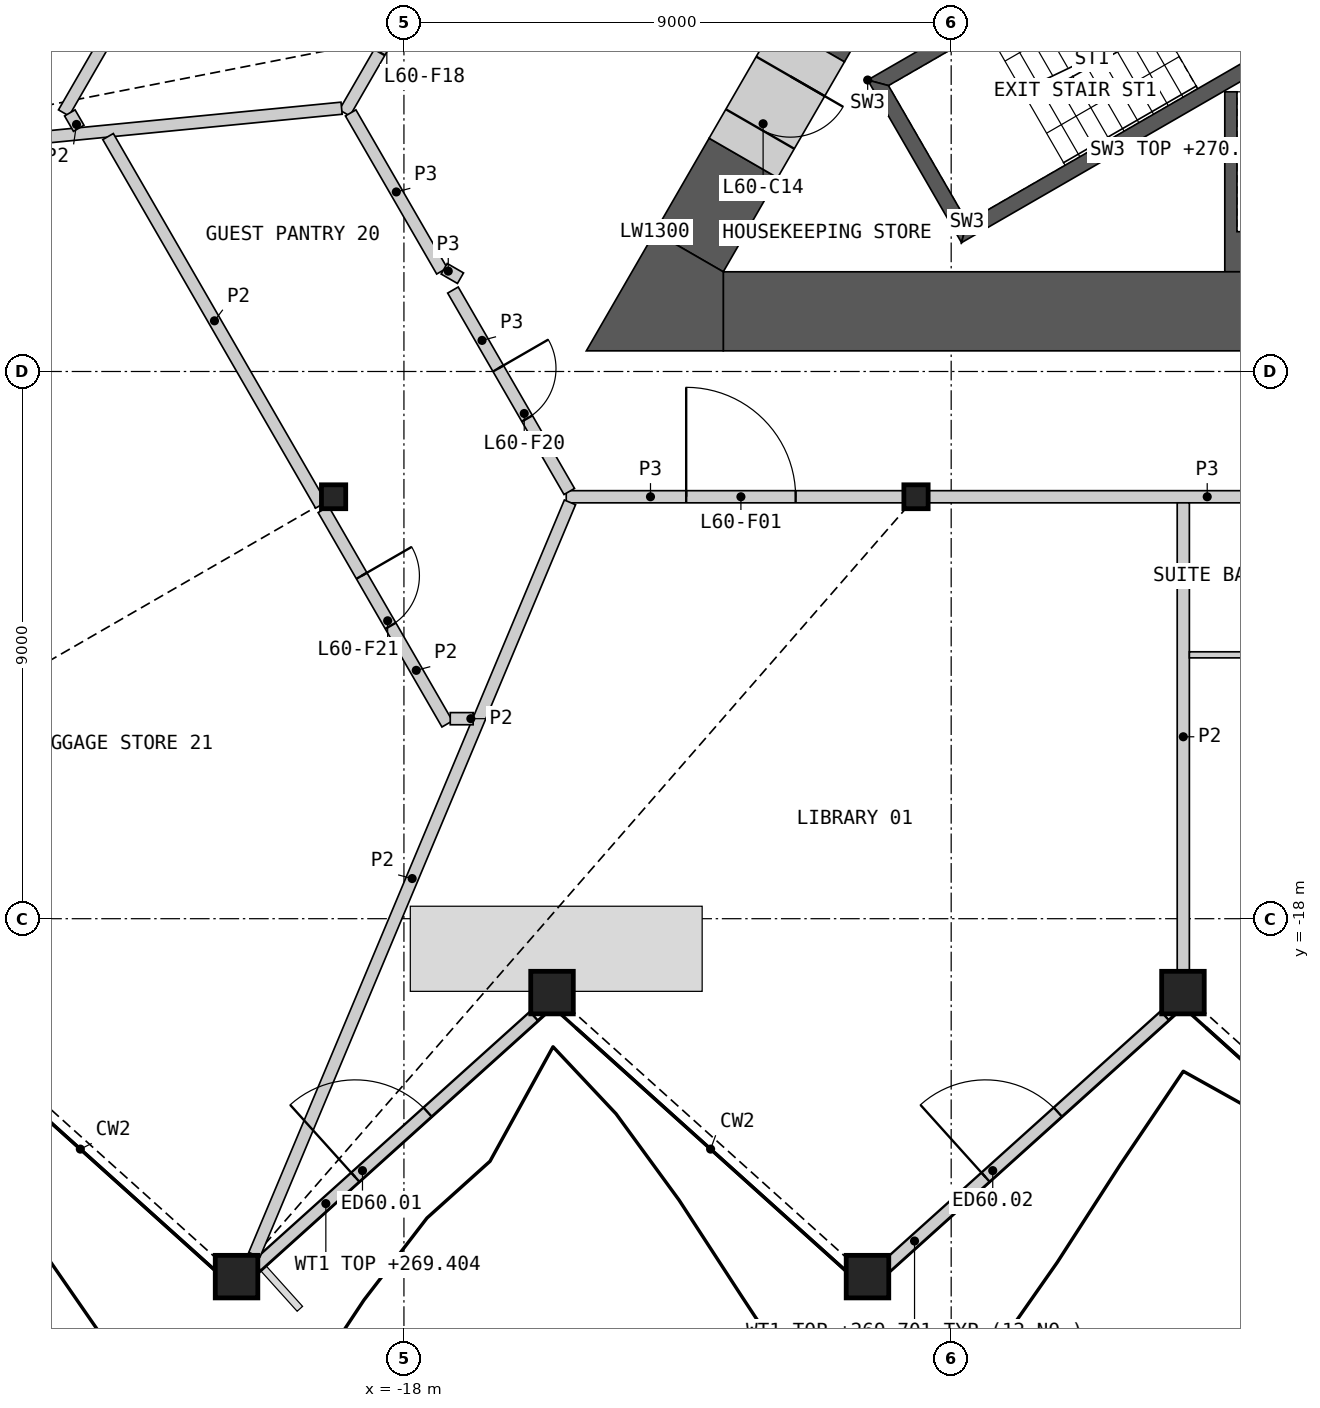
"""IFC4 building model, lengths in metres.
Left out: names, types, materials, properties, quantities, classifications, styles, units other than length and angle.
Written with IfcOpenShell. Run it as: python <this file> out.ifc"""

import sys

from ifc_helpers import new_model, si_unit, direction, frame, frame_2d, origin, origin_2d, place, context, subcontext, project, spatial, polyline, rectangle, hollow_rectangle, i_section, outline, extrude, element, fill, save


model = new_model("IFC4")
c1 = context("Model", 3, precision=1e-05, world=origin(), true_north=direction((0.0, 1.0)))
c2 = subcontext(c1, "Body", "Model", "MODEL_VIEW")
j1 = project(units=[si_unit("LENGTHUNIT", "METRE"), si_unit("PLANEANGLEUNIT", "RADIAN")], contexts=[c1])
p1 = place(None, origin())
s1 = spatial("IfcSite", under=j1, at=p1, CompositionType="ELEMENT")
p2 = place(p1, origin())
s2 = spatial("IfcBuilding", under=s1, at=p2, CompositionType="ELEMENT")
p3 = place(p2, frame((0.0, 0.0, 267.0)))
s3 = spatial("IfcBuildingStorey", under=s2, at=p3, CompositionType="ELEMENT", Elevation=267.0)
for number, where, z_axis, x_axis in (
    (1, (-20.753, -23.887, 0.0), (0.0, 0.0, 1.0), (1.0, 0.0, 0.0)),
    (2, (-15.565, -19.215, 0.0), (0.0, 0.0, 1.0), (1.0, 0.0, 0.0)),
    (3, (-10.376, -23.887, 0.0), (0.0, 0.0, 1.0), (1.0, 0.0, 0.0)),
    (4, (-5.188, -19.215, 0.0), (0.0, 0.0, 1.0), (1.0, 0.0, 0.0)),
):
    element("IfcColumn", number, at=place(p3, frame(where, z_axis=z_axis, x_axis=x_axis)), inside=s3, PredefinedType="COLUMN", context=c2, shape_type="SweptSolid", body=[
        extrude(hollow_rectangle(XDim=0.7, YDim=0.7, WallThickness=0.045, at=origin_2d()), origin(), (0.0, 0.0, 1.0), 3.6),
    ])
for number, where, z_axis, x_axis in (
    (5, (-19.157, -11.06, 0.0), (0.0, 0.0, 1.0), (1.0, 0.0, 0.0)),
    (6, (-9.578, -11.06, 0.0), (0.0, 0.0, 1.0), (1.0, 0.0, 0.0)),
):
    element("IfcColumn", number, at=place(p3, frame(where, z_axis=z_axis, x_axis=x_axis)), inside=s3, PredefinedType="COLUMN", context=c2, shape_type="SweptSolid", body=[
        extrude(i_section(OverallWidth=0.399, OverallDepth=0.393, WebThickness=0.023, FlangeThickness=0.037, at=origin_2d()), origin(), (0.0, 0.0, 1.0), 3.6),
    ])
p4 = place(p3, frame((-20.425, -23.713, 0.0), z_axis=(0.0, 0.0, 1.0), x_axis=(0.74316565197, 0.669107475472, 0.0)))
e7 = element("IfcWall", 7, at=p4, inside=s3, PredefinedType="SOLIDWALL", context=c2, shape_type="SweptSolid", body=[
    extrude(rectangle(XDim=6.142, YDim=0.2, at=frame_2d((3.071, 0.0))), origin(), (0.0, 0.0, 1.0), 2.404),
])
p5 = place(p4, frame((2.186, 0.0, 0.0)))
e8 = element("IfcOpeningElement", 8, at=p5, cuts=e7, PredefinedType="OPENING", context=c2, shape_type="SweptSolid", body=[
    extrude(rectangle(XDim=1.6, YDim=2.4, at=frame_2d((0.8, 1.2))), frame((0.0, 0.11, 0.0), z_axis=(0.0, -1.0, 0.0), x_axis=(1.0, 0.0, 0.0)), (0.0, 0.0, 1.0), 0.22),
])
p6 = place(p3, frame((-10.06, -23.713, 0.0), z_axis=(0.0, 0.0, 1.0), x_axis=(0.74316789204, 0.669104987458, 0.0)))
e9 = element("IfcWall", 9, at=p6, inside=s3, PredefinedType="SOLIDWALL", context=c2, shape_type="SweptSolid", body=[
    extrude(rectangle(XDim=6.154, YDim=0.2, at=frame_2d((3.077, 0.0))), origin(), (0.0, 0.0, 1.0), 2.701),
])
p7 = place(p6, frame((2.186, 0.0, 0.0)))
e10 = element("IfcOpeningElement", 10, at=p7, cuts=e9, PredefinedType="OPENING", context=c2, shape_type="SweptSolid", body=[
    extrude(rectangle(XDim=1.6, YDim=2.4, at=frame_2d((0.8, 1.2))), frame((0.0, 0.11, 0.0), z_axis=(0.0, -1.0, 0.0), x_axis=(1.0, 0.0, 0.0)), (0.0, 0.0, 1.0), 0.22),
])
p8 = place(p3, origin())
e11 = element("IfcWall", 11, at=p8, inside=s3, PredefinedType="SHEAR", context=c2, shape_type="SweptSolid", body=[
    extrude(outline(polyline([(0.1, -7.36), (-4.5, -7.36), (-4.5, -4.4), (-4.3, -4.4), (-4.3, -6.7), (-2.3, -6.7), (-2.3, -4.4), (-2.1, -4.4), (-2.1, -6.7), (-0.1, -6.7), (-0.1, -4.4), (0.1, -4.4), (0.1, -7.36)])), origin(), (0.0, 0.0, 1.0), 3.25),
])
p9 = place(p3, origin())
e12 = element("IfcWall", 12, at=p9, inside=s3, PredefinedType="SHEAR", context=c2, shape_type="SweptSolid", body=[
    extrude(outline(polyline([(-5.307, -1.281), (-10.374, -4.206), (-10.032, -4.298), (-5.182, -1.498), (-5.307, -1.281)])), origin(), (0.0, 0.0, 1.0), 3.25),
])
p10 = place(p3, origin())
e13 = element("IfcWall", 13, at=p10, inside=s3, PredefinedType="SHEAR", context=c2, shape_type="SweptSolid", body=[
    extrude(outline(polyline([(-10.374, -4.206), (-8.83, -6.881), (-8.738, -6.539), (-10.032, -4.298), (-10.374, -4.206)])), origin(), (0.0, 0.0, 1.0), 3.25),
])
p11 = place(p3, origin())
e14 = element("IfcWall", 14, at=p11, inside=s3, PredefinedType="SHEAR", context=c2, shape_type="SweptSolid", body=[
    extrude(outline(polyline([(-8.738, -6.539), (-8.83, -6.881), (-3.763, -3.956), (-3.888, -3.739), (-8.738, -6.539)])), origin(), (0.0, 0.0, 1.0), 3.25),
])
p12 = place(p3, frame((-5.199, -1.219, 0.0), z_axis=(0.0, 0.0, 1.0), x_axis=(0.499982516597, -0.866035497597, 0.0)))
e15 = element("IfcWall", 15, at=p12, inside=s3, PredefinedType="SHEAR", context=c2, shape_type="SweptSolid", body=[
    extrude(rectangle(XDim=3.088, YDim=0.25, at=frame_2d((1.544, 0.0))), origin(), (0.0, 0.0, 1.0), 3.25),
])
p13 = place(p12, frame((0.994, 0.0, 0.0)))
e16 = element("IfcOpeningElement", 16, at=p13, cuts=e15, PredefinedType="OPENING", context=c2, shape_type="SweptSolid", body=[
    extrude(rectangle(XDim=1.1, YDim=2.1, at=frame_2d((0.55, 1.05))), frame((0.0, 0.135, 0.0), z_axis=(0.0, -1.0, 0.0), x_axis=(1.0, 0.0, 0.0)), (0.0, 0.0, 1.0), 0.27),
])
p14 = place(p3, frame((-12.748, -8.01, 0.0), z_axis=(0.0, 0.0, 1.0), x_axis=(1.0, 0.0, 0.0)))
e17 = element("IfcWall", 17, at=p14, inside=s3, PredefinedType="SHEAR", context=c2, shape_type="SweptSolid", body=[
    extrude(rectangle(XDim=25.497, YDim=1.3, at=frame_2d((12.748, 0.0))), origin(), (0.0, 0.0, 1.0), 3.25),
])
p15 = place(p3, frame((-9.137, 0.195, 0.0), z_axis=(0.0, 0.0, 1.0), x_axis=(-0.499985697398, -0.866033661238, 0.0)))
e18 = element("IfcWall", 18, at=p15, inside=s3, PredefinedType="SHEAR", context=c2, shape_type="SweptSolid", body=[
    extrude(rectangle(XDim=4.362, YDim=1.3, at=frame_2d((2.181, 0.0))), origin(), (0.0, 0.0, 1.0), 3.25),
])
p16 = place(p3, frame((-12.418, -5.488, 0.0), z_axis=(0.0, 0.0, 1.0), x_axis=(-0.499931460552, -0.866064971437, 0.0)))
e19 = element("IfcWall", 19, at=p16, inside=s3, PredefinedType="SHEAR", context=c2, shape_type="SweptSolid", body=[
    extrude(rectangle(XDim=1.786, YDim=1.3, at=frame_2d((0.893, 0.0))), origin(), (0.0, 0.0, 1.0), 3.25),
])
p17 = place(p3, origin())
e20 = element("IfcWall", 20, at=p17, inside=s3, PredefinedType="SHEAR", context=c2, shape_type="SweptSolid", body=[
    extrude(outline(polyline([(-13.874, -6.71), (-12.748, -7.36), (-12.748, -8.66), (-15.0, -8.66), (-13.874, -6.71)])), origin(), (0.0, 0.0, 1.0), 3.25),
])
p18 = place(p3, frame((-11.318, -3.583, 0.0), z_axis=(0.0, 0.0, 1.0), x_axis=(-0.50002983664, -0.866008176907, 0.0)))
e21 = element("IfcWall", 21, at=p18, inside=s3, PredefinedType="SHEAR", context=c2, shape_type="SweptSolid", body=[
    extrude(rectangle(XDim=2.2, YDim=1.3, at=frame_2d((1.1, 0.0))), origin(), (0.0, 0.0, 1.0), 3.25),
])
p19 = place(p18, frame((0.65, 0.0, 0.0)))
e22 = element("IfcOpeningElement", 22, at=p19, cuts=e21, PredefinedType="OPENING", context=c2, shape_type="SweptSolid", body=[
    extrude(rectangle(XDim=1.0, YDim=2.1, at=frame_2d((0.5, 1.05))), frame((0.0, 0.66, 0.0), z_axis=(0.0, -1.0, 0.0), x_axis=(1.0, 0.0, 0.0)), (0.0, 0.0, 1.0), 1.32),
])
p20 = place(p3, frame((-18.976, -4.747, 0.0), z_axis=(0.0, 0.0, 1.0), x_axis=(0.499999852422, 0.866025488988, 0.0)))
e23 = element("IfcWall", 23, at=p20, inside=s3, PredefinedType="PARTITIONING", context=c2, shape_type="SweptSolid", body=[
    extrude(rectangle(XDim=27.198, YDim=0.2, at=frame_2d((13.599, 0.0))), origin(), (0.0, 0.0, 1.0), 3.25),
])
p21 = place(p20, frame((19.886, 0.0, 0.0)))
e24 = element("IfcOpeningElement", 24, at=p21, cuts=e23, PredefinedType="OPENING", context=c2, shape_type="SweptSolid", body=[
    extrude(rectangle(XDim=0.95, YDim=2.1, at=frame_2d((0.475, 1.05))), frame((0.0, 0.11, 0.0), z_axis=(0.0, -1.0, 0.0), x_axis=(1.0, 0.0, 0.0)), (0.0, 0.0, 1.0), 0.22),
])
p22 = place(p20, frame((11.895, 0.0, 0.0)))
e25 = element("IfcOpeningElement", 25, at=p22, cuts=e23, PredefinedType="OPENING", context=c2, shape_type="SweptSolid", body=[
    extrude(rectangle(XDim=1.1, YDim=2.1, at=frame_2d((0.55, 1.05))), frame((0.0, 0.11, 0.0), z_axis=(0.0, -1.0, 0.0), x_axis=(1.0, 0.0, 0.0)), (0.0, 0.0, 1.0), 0.22),
])
p23 = place(p20, frame((1.152, 0.0, 0.0)))
e26 = element("IfcOpeningElement", 26, at=p23, cuts=e23, PredefinedType="OPENING", context=c2, shape_type="SweptSolid", body=[
    extrude(rectangle(XDim=0.95, YDim=2.1, at=frame_2d((0.475, 1.05))), frame((0.0, 0.11, 0.0), z_axis=(0.0, -1.0, 0.0), x_axis=(1.0, 0.0, 0.0)), (0.0, 0.0, 1.0), 0.22),
])
p24 = place(p3, frame((-9.369, -11.06, 0.0), z_axis=(0.0, 0.0, 1.0), x_axis=(1.0, 0.0, 0.0)))
e27 = element("IfcWall", 27, at=p24, inside=s3, PredefinedType="PARTITIONING", context=c2, shape_type="SweptSolid", body=[
    extrude(rectangle(XDim=9.159, YDim=0.2, at=frame_2d((4.58, 0.0))), origin(), (0.0, 0.0, 1.0), 3.25),
])
p25 = place(p3, frame((-15.331, -11.06, 0.0), z_axis=(0.0, 0.0, 1.0), x_axis=(1.0, 0.0, 0.0)))
e28 = element("IfcWall", 28, at=p25, inside=s3, PredefinedType="PARTITIONING", context=c2, shape_type="SweptSolid", body=[
    extrude(rectangle(XDim=5.543, YDim=0.2, at=frame_2d((2.771, 0.0))), origin(), (0.0, 0.0, 1.0), 3.25),
])
p26 = place(p25, frame((1.973, 0.0, 0.0)))
e29 = element("IfcOpeningElement", 29, at=p26, cuts=e28, PredefinedType="OPENING", context=c2, shape_type="SweptSolid", body=[
    extrude(rectangle(XDim=1.8, YDim=2.1, at=frame_2d((0.9, 1.05))), frame((0.0, 0.11, 0.0), z_axis=(0.0, -1.0, 0.0), x_axis=(1.0, 0.0, 0.0)), (0.0, 0.0, 1.0), 0.22),
])
p27 = place(p3, frame((-17.194, -7.66, 0.0), z_axis=(0.0, 0.0, 1.0), x_axis=(0.499989446428, -0.866031496806, 0.0)))
e30 = element("IfcWall", 30, at=p27, inside=s3, PredefinedType="PARTITIONING", context=c2, shape_type="SweptSolid", body=[
    extrude(rectangle(XDim=3.826, YDim=0.2, at=frame_2d((1.913, 0.0))), origin(), (0.0, 0.0, 1.0), 3.25),
])
p28 = place(p27, frame((1.49, 0.0, 0.0)))
e31 = element("IfcOpeningElement", 31, at=p28, cuts=e30, PredefinedType="OPENING", context=c2, shape_type="SweptSolid", body=[
    extrude(rectangle(XDim=0.95, YDim=2.1, at=frame_2d((0.475, 1.05))), frame((0.0, 0.11, 0.0), z_axis=(0.0, -1.0, 0.0), x_axis=(1.0, 0.0, 0.0)), (0.0, 0.0, 1.0), 0.22),
])
p29 = place(p3, frame((-18.876, -4.747, 0.0), z_axis=(0.0, 0.0, 1.0), x_axis=(0.499952404951, -0.866052881055, 0.0)))
e32 = element("IfcWall", 32, at=p29, inside=s3, PredefinedType="PARTITIONING", context=c2, shape_type="SweptSolid", body=[
    extrude(rectangle(XDim=3.002, YDim=0.2, at=frame_2d((1.501, 0.0))), origin(), (0.0, 0.0, 1.0), 3.25),
])
p30 = place(p3, frame((-17.338, -7.31, 0.0), z_axis=(0.0, 0.0, 1.0), x_axis=(0.866054481515, -0.499949632511, 0.0)))
e33 = element("IfcWall", 33, at=p30, inside=s3, PredefinedType="PARTITIONING", context=c2, shape_type="SweptSolid", body=[
    extrude(rectangle(XDim=0.31, YDim=0.2, at=frame_2d((0.155, 0.0))), origin(), (0.0, 0.0, 1.0), 3.25),
])
p31 = place(p3, frame((-20.46, -23.527, 0.0), z_axis=(0.0, 0.0, 1.0), x_axis=(0.386788567553, 0.922168424969, 0.0)))
e34 = element("IfcWall", 34, at=p31, inside=s3, PredefinedType="PARTITIONING", context=c2, shape_type="SweptSolid", body=[
    extrude(rectangle(XDim=13.419, YDim=0.2, at=frame_2d((6.709, 0.0))), origin(), (0.0, 0.0, 1.0), 2.404),
])
p32 = place(p3, frame((-30.703, -5.809, 0.0), z_axis=(0.0, 0.0, 1.0), x_axis=(0.99527973335, 0.097047680974, 0.0)))
e35 = element("IfcWall", 35, at=p32, inside=s3, PredefinedType="PARTITIONING", context=c2, shape_type="SweptSolid", body=[
    extrude(rectangle(XDim=11.733, YDim=0.2, at=frame_2d((5.867, 0.0))), origin(), (0.0, 0.0, 1.0), 2.404),
])
p33 = place(p3, frame((-5.183, -18.855, 0.0), z_axis=(0.0, 0.0, 1.0), x_axis=(0.0, 1.0, 0.0)))
e36 = element("IfcWall", 36, at=p33, inside=s3, PredefinedType="PARTITIONING", context=c2, shape_type="SweptSolid", body=[
    extrude(rectangle(XDim=7.695, YDim=0.2, at=frame_2d((3.848, 0.0))), origin(), (0.0, 0.0, 1.0), 2.404),
])
p34 = place(p3, frame((-22.866, -5.136, 0.0), z_axis=(0.0, 0.0, 1.0), x_axis=(0.499988162555, -0.866032238029, 0.0)))
e37 = element("IfcWall", 37, at=p34, inside=s3, PredefinedType="PARTITIONING", context=c2, shape_type="SweptSolid", body=[
    extrude(rectangle(XDim=6.999, YDim=0.2, at=frame_2d((3.5, 0.0))), origin(), (0.0, 0.0, 1.0), 2.404),
])
p35 = place(p3, frame((-23.595, -4.747, 0.0), z_axis=(0.0, 0.0, 1.0), x_axis=(0.500003308737, 0.866023493476, 0.0)))
e38 = element("IfcWall", 38, at=p35, inside=s3, PredefinedType="PARTITIONING", context=c2, shape_type="SweptSolid", body=[
    extrude(rectangle(XDim=5.443, YDim=0.2, at=frame_2d((2.721, 0.0))), origin(), (0.0, 0.0, 1.0), 2.404),
])
p36 = place(p35, frame((2.093, 0.0, 0.0)))
e39 = element("IfcOpeningElement", 39, at=p36, cuts=e38, PredefinedType="OPENING", context=c2, shape_type="SweptSolid", body=[
    extrude(rectangle(XDim=0.95, YDim=2.1, at=frame_2d((0.475, 1.05))), frame((0.0, 0.11, 0.0), z_axis=(0.0, -1.0, 0.0), x_axis=(1.0, 0.0, 0.0)), (0.0, 0.0, 1.0), 0.22),
])
p37 = place(p3, frame((-19.325, -11.27, 0.0), z_axis=(0.0, 0.0, 1.0), x_axis=(0.500000928893, -0.866024867487, 0.0)))
e40 = element("IfcWall", 40, at=p37, inside=s3, PredefinedType="PARTITIONING", context=c2, shape_type="SweptSolid", body=[
    extrude(rectangle(XDim=4.073, YDim=0.2, at=frame_2d((2.036, 0.0))), origin(), (0.0, 0.0, 1.0), 2.404),
])
p38 = place(p37, frame((1.259, 0.0, 0.0)))
e41 = element("IfcOpeningElement", 41, at=p38, cuts=e40, PredefinedType="OPENING", context=c2, shape_type="SweptSolid", body=[
    extrude(rectangle(XDim=0.95, YDim=2.1, at=frame_2d((0.475, 1.05))), frame((0.0, 0.11, 0.0), z_axis=(0.0, -1.0, 0.0), x_axis=(1.0, 0.0, 0.0)), (0.0, 0.0, 1.0), 0.22),
])
p39 = place(p3, frame((-17.238, -14.71, 0.0), z_axis=(0.0, 0.0, 1.0), x_axis=(1.0, 0.0, 0.0)))
e42 = element("IfcWall", 42, at=p39, inside=s3, PredefinedType="PARTITIONING", context=c2, shape_type="SweptSolid", body=[
    extrude(rectangle(XDim=0.376, YDim=0.2, at=frame_2d((0.188, 0.0))), origin(), (0.0, 0.0, 1.0), 2.404),
])
p40 = place(p3, frame((-23.495, -4.747, 0.0), z_axis=(0.0, 0.0, 1.0), x_axis=(0.500180211149, -0.865921333826, 0.0)))
e43 = element("IfcWall", 43, at=p40, inside=s3, PredefinedType="PARTITIONING", context=c2, shape_type="SweptSolid", body=[
    extrude(rectangle(XDim=0.292, YDim=0.2, at=frame_2d((0.146, 0.0))), origin(), (0.0, 0.0, 1.0), 2.404),
])
p41 = place(p3, frame((-5.083, -13.66, 0.0), z_axis=(0.0, 0.0, 1.0), x_axis=(1.0, 0.0, 0.0)))
e44 = element("IfcWall", 44, at=p41, inside=s3, PredefinedType="PARTITIONING", context=c2, shape_type="SweptSolid", body=[
    extrude(rectangle(XDim=2.95, YDim=0.1, at=frame_2d((1.475, 0.0))), origin(), (0.0, 0.0, 1.0), 2.404),
])
p42 = place(p41, frame((1.75, 0.0, 0.0)))
e45 = element("IfcOpeningElement", 45, at=p42, cuts=e44, PredefinedType="OPENING", context=c2, shape_type="SweptSolid", body=[
    extrude(rectangle(XDim=0.95, YDim=2.1, at=frame_2d((0.475, 1.05))), frame((0.0, 0.06, 0.0), z_axis=(0.0, -1.0, 0.0), x_axis=(1.0, 0.0, 0.0)), (0.0, 0.0, 1.0), 0.12),
])
p43 = place(p5, origin())
e46 = element("IfcDoor", 46, at=p43, inside=s3, OperationType="DOUBLE_DOOR_SINGLE_SWING", PredefinedType="DOOR", context=c2, shape_type="SweptSolid", body=[
    extrude(rectangle(XDim=1.6, YDim=2.4, at=frame_2d((0.8, 1.2))), frame((0.0, 0.025, 0.0), z_axis=(0.0, -1.0, 0.0), x_axis=(1.0, 0.0, 0.0)), (0.0, 0.0, 1.0), 0.05),
])
fill(e8, e46)
p44 = place(p7, origin())
e47 = element("IfcDoor", 47, at=p44, inside=s3, OperationType="DOUBLE_DOOR_SINGLE_SWING", PredefinedType="DOOR", context=c2, shape_type="SweptSolid", body=[
    extrude(rectangle(XDim=1.6, YDim=2.4, at=frame_2d((0.8, 1.2))), frame((0.0, 0.025, 0.0), z_axis=(0.0, -1.0, 0.0), x_axis=(1.0, 0.0, 0.0)), (0.0, 0.0, 1.0), 0.05),
])
fill(e10, e47)
p45 = place(p19, origin())
e48 = element("IfcDoor", 48, at=p45, inside=s3, OperationType="SINGLE_SWING_LEFT", PredefinedType="DOOR", context=c2, shape_type="SweptSolid", body=[
    extrude(rectangle(XDim=1.0, YDim=2.1, at=frame_2d((0.5, 1.05))), frame((0.0, 0.405, 0.0), z_axis=(0.0, -1.0, 0.0), x_axis=(1.0, 0.0, 0.0)), (0.0, 0.0, 1.0), 0.05),
])
fill(e22, e48)
p46 = place(p26, origin())
e49 = element("IfcDoor", 49, at=p46, inside=s3, OperationType="DOUBLE_DOOR_SINGLE_SWING", PredefinedType="DOOR", context=c2, shape_type="SweptSolid", body=[
    extrude(rectangle(XDim=1.8, YDim=2.1, at=frame_2d((0.9, 1.05))), frame((0.0, 0.025, 0.0), z_axis=(0.0, -1.0, 0.0), x_axis=(1.0, 0.0, 0.0)), (0.0, 0.0, 1.0), 0.05),
])
fill(e29, e49)
p47 = place(p23, origin())
e50 = element("IfcDoor", 50, at=p47, inside=s3, OperationType="SINGLE_SWING_RIGHT", PredefinedType="DOOR", context=c2, shape_type="SweptSolid", body=[
    extrude(rectangle(XDim=0.95, YDim=2.1, at=frame_2d((0.475, 1.05))), frame((0.0, 0.025, 0.0), z_axis=(0.0, -1.0, 0.0), x_axis=(1.0, 0.0, 0.0)), (0.0, 0.0, 1.0), 0.05),
])
fill(e26, e50)
p48 = place(p28, origin())
e51 = element("IfcDoor", 51, at=p48, inside=s3, OperationType="SINGLE_SWING_LEFT", PredefinedType="DOOR", context=c2, shape_type="SweptSolid", body=[
    extrude(rectangle(XDim=0.95, YDim=2.1, at=frame_2d((0.475, 1.05))), frame((0.0, 0.025, 0.0), z_axis=(0.0, -1.0, 0.0), x_axis=(1.0, 0.0, 0.0)), (0.0, 0.0, 1.0), 0.05),
])
fill(e31, e51)
p49 = place(p38, origin())
e52 = element("IfcDoor", 52, at=p49, inside=s3, OperationType="SINGLE_SWING_LEFT", PredefinedType="DOOR", context=c2, shape_type="SweptSolid", body=[
    extrude(rectangle(XDim=0.95, YDim=2.1, at=frame_2d((0.475, 1.05))), frame((0.0, 0.025, 0.0), z_axis=(0.0, -1.0, 0.0), x_axis=(1.0, 0.0, 0.0)), (0.0, 0.0, 1.0), 0.05),
])
fill(e41, e52)
save(model, sys.argv[1])
